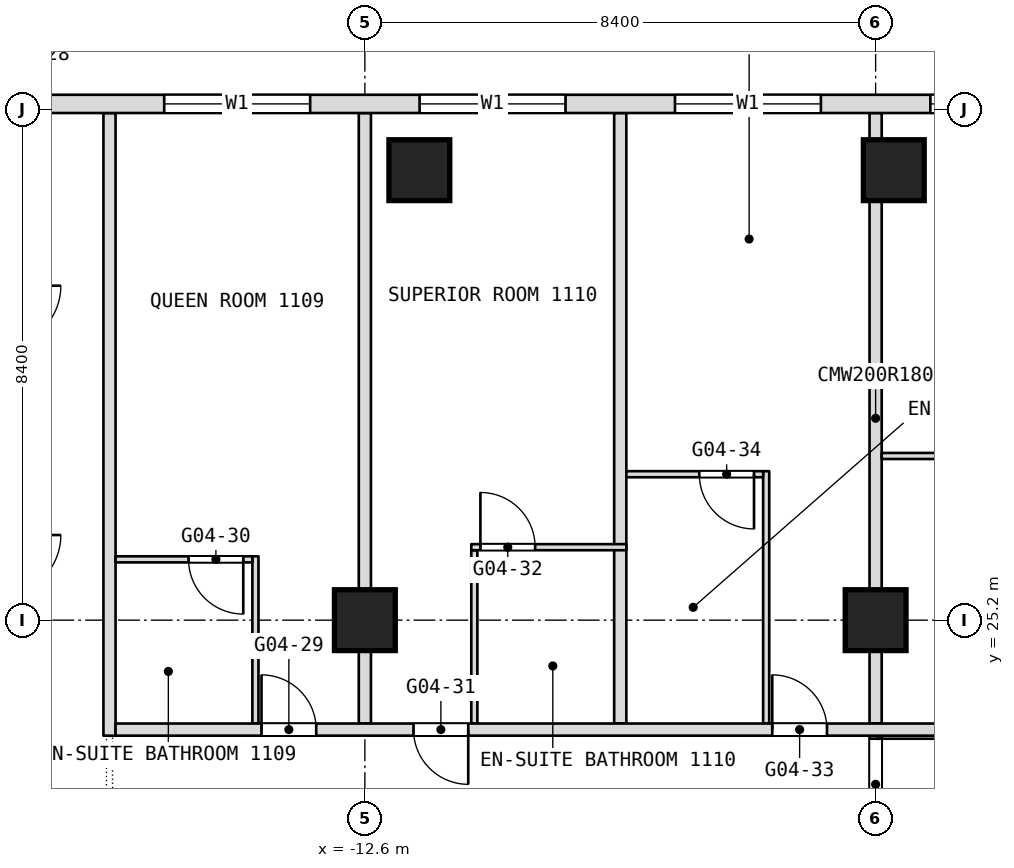
"""IFC4 building model, lengths in metres.
Left out: names, types, materials, properties, quantities, classifications, styles, units other than length and angle.
Written with IfcOpenShell. Run it as: python <this file> out.ifc"""

import sys

from ifc_helpers import new_model, si_unit, direction, frame, frame_2d, origin, origin_2d, place, context, subcontext, project, spatial, rectangle, extrude, element, fill, save


model = new_model("IFC4")
c1 = context("Model", 3, precision=1e-05, world=origin(), true_north=direction((0.0, 1.0)))
c2 = subcontext(c1, "Body", "Model", "MODEL_VIEW")
j1 = project(units=[si_unit("LENGTHUNIT", "METRE"), si_unit("PLANEANGLEUNIT", "RADIAN")], contexts=[c1])
p1 = place(None, origin())
s1 = spatial("IfcSite", under=j1, at=p1, CompositionType="ELEMENT")
p2 = place(p1, origin())
s2 = spatial("IfcBuilding", under=s1, at=p2, CompositionType="ELEMENT")
p3 = place(p2, frame((0.0, 0.0, 54.5)))
s3 = spatial("IfcBuildingStorey", under=s2, at=p3, CompositionType="ELEMENT", Elevation=54.5)
for number, where, z_axis, x_axis in (
    (1, (-12.6, 25.2, 0.0), (0.0, 0.0, 1.0), (1.0, 0.0, 0.0)),
    (2, (-4.2, 25.2, 0.0), (0.0, 0.0, 1.0), (1.0, 0.0, 0.0)),
    (3, (-11.704, 32.6, 0.0), (0.0, 0.0, 1.0), (1.0, 0.0, 0.0)),
    (4, (-3.901, 32.6, 0.0), (0.0, 0.0, 1.0), (1.0, 0.0, 0.0)),
):
    element("IfcColumn", number, at=place(p3, frame(where, z_axis=z_axis, x_axis=x_axis)), inside=s3, PredefinedType="COLUMN", context=c2, shape_type="SweptSolid", body=[
        extrude(rectangle(XDim=1.0, YDim=1.0, at=origin_2d()), origin(), (0.0, 0.0, 1.0), 3.6),
    ])
p4 = place(p3, frame((-4.2, 16.8, 0.0), z_axis=(0.0, 0.0, 1.0), x_axis=(0.0, 1.0, 0.0)))
e5 = element("IfcWall", 5, at=p4, inside=s3, PredefinedType="PARTITIONING", context=c2, shape_type="SweptSolid", body=[
    extrude(rectangle(XDim=6.7, YDim=0.2, at=frame_2d((3.35, 0.0))), origin(), (0.0, 0.0, 1.0), 3.34),
])
p5 = place(p4, frame((0.15, 0.0, 0.0)))
e6 = element("IfcOpeningElement", 6, at=p5, cuts=e5, PredefinedType="OPENING", context=c2, shape_type="SweptSolid", body=[
    extrude(rectangle(XDim=1.5, YDim=2.1, at=frame_2d((0.75, 1.05))), frame((0.0, 0.1, 0.0), z_axis=(0.0, -1.0, 0.0), x_axis=(1.0, 0.0, 0.0)), (0.0, 0.0, 1.0), 0.2),
])
p6 = place(p4, frame((4.95, 0.0, 0.0)))
e7 = element("IfcOpeningElement", 7, at=p6, cuts=e5, PredefinedType="OPENING", context=c2, shape_type="SweptSolid", body=[
    extrude(rectangle(XDim=1.5, YDim=2.1, at=frame_2d((0.75, 1.05))), frame((0.0, 0.1, 0.0), z_axis=(0.0, -1.0, 0.0), x_axis=(1.0, 0.0, 0.0)), (0.0, 0.0, 1.0), 0.2),
])
p7 = place(p3, frame((-4.2, 23.5, 0.0), z_axis=(0.0, 0.0, 1.0), x_axis=(0.0, 1.0, 0.0)))
e8 = element("IfcWall", 8, at=p7, inside=s3, PredefinedType="PARTITIONING", context=c2, shape_type="SweptSolid", body=[
    extrude(rectangle(XDim=10.04, YDim=0.2, at=frame_2d((5.02, 0.0))), origin(), (0.0, 0.0, 1.0), 3.34),
])
p8 = place(p3, frame((-6.0, 23.5, 0.0), z_axis=(0.0, 0.0, 1.0), x_axis=(0.0, 1.0, 0.0)))
e9 = element("IfcWall", 9, at=p8, inside=s3, PredefinedType="PARTITIONING", context=c2, shape_type="SweptSolid", body=[
    extrude(rectangle(XDim=4.15, YDim=0.1, at=frame_2d((2.075, 0.0))), origin(), (0.0, 0.0, 1.0), 3.34),
])
p9 = place(p3, frame((-8.4, 23.5, 0.0), z_axis=(0.0, 0.0, 1.0), x_axis=(0.0, 1.0, 0.0)))
e10 = element("IfcWall", 10, at=p9, inside=s3, PredefinedType="PARTITIONING", context=c2, shape_type="SweptSolid", body=[
    extrude(rectangle(XDim=10.04, YDim=0.2, at=frame_2d((5.02, 0.0))), origin(), (0.0, 0.0, 1.0), 3.34),
])
p10 = place(p3, frame((-10.8, 23.5, 0.0), z_axis=(0.0, 0.0, 1.0), x_axis=(0.0, 1.0, 0.0)))
e11 = element("IfcWall", 11, at=p10, inside=s3, PredefinedType="PARTITIONING", context=c2, shape_type="SweptSolid", body=[
    extrude(rectangle(XDim=2.85, YDim=0.1, at=frame_2d((1.425, 0.0))), origin(), (0.0, 0.0, 1.0), 3.34),
])
p11 = place(p3, frame((-12.6, 23.5, 0.0), z_axis=(0.0, 0.0, 1.0), x_axis=(0.0, 1.0, 0.0)))
e12 = element("IfcWall", 12, at=p11, inside=s3, PredefinedType="PARTITIONING", context=c2, shape_type="SweptSolid", body=[
    extrude(rectangle(XDim=10.04, YDim=0.2, at=frame_2d((5.02, 0.0))), origin(), (0.0, 0.0, 1.0), 3.34),
])
p12 = place(p3, frame((-14.4, 23.5, 0.0), z_axis=(0.0, 0.0, 1.0), x_axis=(0.0, 1.0, 0.0)))
e13 = element("IfcWall", 13, at=p12, inside=s3, PredefinedType="PARTITIONING", context=c2, shape_type="SweptSolid", body=[
    extrude(rectangle(XDim=2.75, YDim=0.1, at=frame_2d((1.375, 0.0))), origin(), (0.0, 0.0, 1.0), 3.34),
])
p13 = place(p3, frame((-16.8, 23.3, 0.0), z_axis=(0.0, 0.0, 1.0), x_axis=(0.0, 1.0, 0.0)))
e14 = element("IfcWall", 14, at=p13, inside=s3, PredefinedType="PARTITIONING", context=c2, shape_type="SweptSolid", body=[
    extrude(rectangle(XDim=10.24, YDim=0.2, at=frame_2d((5.12, 0.0))), origin(), (0.0, 0.0, 1.0), 3.34),
])
p14 = place(p3, frame((-16.7, 23.4, 0.0), z_axis=(0.0, 0.0, 1.0), x_axis=(1.0, 0.0, 0.0)))
e15 = element("IfcWall", 15, at=p14, inside=s3, PredefinedType="PARTITIONING", context=c2, shape_type="SweptSolid", body=[
    extrude(rectangle(XDim=23.4, YDim=0.2, at=frame_2d((11.7, 0.0))), origin(), (0.0, 0.0, 1.0), 3.34),
])
p15 = place(p14, frame((2.4, 0.0, 0.0)))
e16 = element("IfcOpeningElement", 16, at=p15, cuts=e15, PredefinedType="OPENING", context=c2, shape_type="SweptSolid", body=[
    extrude(rectangle(XDim=0.9, YDim=2.1, at=frame_2d((0.45, 1.05))), frame((0.0, 0.1, 0.0), z_axis=(0.0, -1.0, 0.0), x_axis=(1.0, 0.0, 0.0)), (0.0, 0.0, 1.0), 0.2),
])
p16 = place(p14, frame((4.9, 0.0, 0.0)))
e17 = element("IfcOpeningElement", 17, at=p16, cuts=e15, PredefinedType="OPENING", context=c2, shape_type="SweptSolid", body=[
    extrude(rectangle(XDim=0.9, YDim=2.1, at=frame_2d((0.45, 1.05))), frame((0.0, 0.1, 0.0), z_axis=(0.0, -1.0, 0.0), x_axis=(1.0, 0.0, 0.0)), (0.0, 0.0, 1.0), 0.2),
])
p17 = place(p14, frame((10.8, 0.0, 0.0)))
e18 = element("IfcOpeningElement", 18, at=p17, cuts=e15, PredefinedType="OPENING", context=c2, shape_type="SweptSolid", body=[
    extrude(rectangle(XDim=0.9, YDim=2.1, at=frame_2d((0.45, 1.05))), frame((0.0, 0.1, 0.0), z_axis=(0.0, -1.0, 0.0), x_axis=(1.0, 0.0, 0.0)), (0.0, 0.0, 1.0), 0.2),
])
p18 = place(p14, frame((16.2, 0.0, 0.0)))
e19 = element("IfcOpeningElement", 19, at=p18, cuts=e15, PredefinedType="OPENING", context=c2, shape_type="SweptSolid", body=[
    extrude(rectangle(XDim=1.1, YDim=2.1, at=frame_2d((0.55, 1.05))), frame((0.0, 0.1, 0.0), z_axis=(0.0, -1.0, 0.0), x_axis=(1.0, 0.0, 0.0)), (0.0, 0.0, 1.0), 0.2),
])
p19 = place(p14, frame((21.7, 0.0, 0.0)))
e20 = element("IfcOpeningElement", 20, at=p19, cuts=e15, PredefinedType="OPENING", context=c2, shape_type="SweptSolid", body=[
    extrude(rectangle(XDim=0.9, YDim=2.1, at=frame_2d((0.45, 1.05))), frame((0.0, 0.1, 0.0), z_axis=(0.0, -1.0, 0.0), x_axis=(1.0, 0.0, 0.0)), (0.0, 0.0, 1.0), 0.2),
])
p20 = place(p3, frame((-16.7, 26.2, 0.0), z_axis=(0.0, 0.0, 1.0), x_axis=(1.0, 0.0, 0.0)))
e21 = element("IfcWall", 21, at=p20, inside=s3, PredefinedType="PARTITIONING", context=c2, shape_type="SweptSolid", body=[
    extrude(rectangle(XDim=2.25, YDim=0.1, at=frame_2d((1.125, 0.0))), origin(), (0.0, 0.0, 1.0), 3.34),
])
p21 = place(p20, frame((1.2, 0.0, 0.0)))
e22 = element("IfcOpeningElement", 22, at=p21, cuts=e21, PredefinedType="OPENING", context=c2, shape_type="SweptSolid", body=[
    extrude(rectangle(XDim=0.9, YDim=2.1, at=frame_2d((0.45, 1.05))), frame((0.0, 0.05, 0.0), z_axis=(0.0, -1.0, 0.0), x_axis=(1.0, 0.0, 0.0)), (0.0, 0.0, 1.0), 0.1),
])
p22 = place(p3, frame((-10.85, 26.4, 0.0), z_axis=(0.0, 0.0, 1.0), x_axis=(1.0, 0.0, 0.0)))
e23 = element("IfcWall", 23, at=p22, inside=s3, PredefinedType="PARTITIONING", context=c2, shape_type="SweptSolid", body=[
    extrude(rectangle(XDim=2.55, YDim=0.1, at=frame_2d((1.275, 0.0))), origin(), (0.0, 0.0, 1.0), 3.34),
])
p23 = place(p22, frame((0.15, 0.0, 0.0)))
e24 = element("IfcOpeningElement", 24, at=p23, cuts=e23, PredefinedType="OPENING", context=c2, shape_type="SweptSolid", body=[
    extrude(rectangle(XDim=0.9, YDim=2.1, at=frame_2d((0.45, 1.05))), frame((0.0, 0.05, 0.0), z_axis=(0.0, -1.0, 0.0), x_axis=(1.0, 0.0, 0.0)), (0.0, 0.0, 1.0), 0.1),
])
p24 = place(p3, frame((-8.3, 27.6, 0.0), z_axis=(0.0, 0.0, 1.0), x_axis=(1.0, 0.0, 0.0)))
e25 = element("IfcWall", 25, at=p24, inside=s3, PredefinedType="PARTITIONING", context=c2, shape_type="SweptSolid", body=[
    extrude(rectangle(XDim=2.25, YDim=0.1, at=frame_2d((1.125, 0.0))), origin(), (0.0, 0.0, 1.0), 3.34),
])
p25 = place(p24, frame((1.2, 0.0, 0.0)))
e26 = element("IfcOpeningElement", 26, at=p25, cuts=e25, PredefinedType="OPENING", context=c2, shape_type="SweptSolid", body=[
    extrude(rectangle(XDim=0.9, YDim=2.1, at=frame_2d((0.45, 1.05))), frame((0.0, 0.05, 0.0), z_axis=(0.0, -1.0, 0.0), x_axis=(1.0, 0.0, 0.0)), (0.0, 0.0, 1.0), 0.1),
])
p26 = place(p3, frame((-4.1, 27.9, 0.0), z_axis=(0.0, 0.0, 1.0), x_axis=(1.0, 0.0, 0.0)))
e27 = element("IfcWall", 27, at=p26, inside=s3, PredefinedType="PARTITIONING", context=c2, shape_type="SweptSolid", body=[
    extrude(rectangle(XDim=3.45, YDim=0.1, at=frame_2d((1.725, 0.0))), origin(), (0.0, 0.0, 1.0), 3.34),
])
p27 = place(p26, frame((2.4, 0.0, 0.0)))
e28 = element("IfcOpeningElement", 28, at=p27, cuts=e27, PredefinedType="OPENING", context=c2, shape_type="SweptSolid", body=[
    extrude(rectangle(XDim=0.9, YDim=2.1, at=frame_2d((0.45, 1.05))), frame((0.0, 0.05, 0.0), z_axis=(0.0, -1.0, 0.0), x_axis=(1.0, 0.0, 0.0)), (0.0, 0.0, 1.0), 0.1),
])
p28 = place(p3, frame((23.406, 33.69, 0.0), z_axis=(0.0, 0.0, 1.0), x_axis=(-1.0, 0.0, 0.0)))
e29 = element("IfcWall", 29, at=p28, inside=s3, PredefinedType="NOTDEFINED", context=c2, shape_type="SweptSolid", body=[
    extrude(rectangle(XDim=46.812, YDim=0.3, at=frame_2d((23.406, 0.0))), origin(), (0.0, 0.0, 1.0), 3.6),
])
p29 = place(p28, frame((2.186, 0.0, 0.9)))
e30 = element("IfcOpeningElement", 30, at=p29, cuts=e29, PredefinedType="OPENING", context=c2, shape_type="SweptSolid", body=[
    extrude(rectangle(XDim=2.4, YDim=2.1, at=frame_2d((1.2, 1.05))), frame((0.0, 0.15, 0.0), z_axis=(0.0, -1.0, 0.0), x_axis=(1.0, 0.0, 0.0)), (0.0, 0.0, 1.0), 0.3),
])
p30 = place(p28, frame((7.506, 0.0, 0.9)))
e31 = element("IfcOpeningElement", 31, at=p30, cuts=e29, PredefinedType="OPENING", context=c2, shape_type="SweptSolid", body=[
    extrude(rectangle(XDim=2.4, YDim=2.1, at=frame_2d((1.2, 1.05))), frame((0.0, 0.15, 0.0), z_axis=(0.0, -1.0, 0.0), x_axis=(1.0, 0.0, 0.0)), (0.0, 0.0, 1.0), 0.3),
])
p31 = place(p28, frame((11.706, 0.0, 0.9)))
e32 = element("IfcOpeningElement", 32, at=p31, cuts=e29, PredefinedType="OPENING", context=c2, shape_type="SweptSolid", body=[
    extrude(rectangle(XDim=2.4, YDim=2.1, at=frame_2d((1.2, 1.05))), frame((0.0, 0.15, 0.0), z_axis=(0.0, -1.0, 0.0), x_axis=(1.0, 0.0, 0.0)), (0.0, 0.0, 1.0), 0.3),
])
p32 = place(p28, frame((15.906, 0.0, 0.9)))
e33 = element("IfcOpeningElement", 33, at=p32, cuts=e29, PredefinedType="OPENING", context=c2, shape_type="SweptSolid", body=[
    extrude(rectangle(XDim=2.4, YDim=2.1, at=frame_2d((1.2, 1.05))), frame((0.0, 0.15, 0.0), z_axis=(0.0, -1.0, 0.0), x_axis=(1.0, 0.0, 0.0)), (0.0, 0.0, 1.0), 0.3),
])
p33 = place(p28, frame((20.106, 0.0, 0.9)))
e34 = element("IfcOpeningElement", 34, at=p33, cuts=e29, PredefinedType="OPENING", context=c2, shape_type="SweptSolid", body=[
    extrude(rectangle(XDim=2.4, YDim=2.1, at=frame_2d((1.2, 1.05))), frame((0.0, 0.15, 0.0), z_axis=(0.0, -1.0, 0.0), x_axis=(1.0, 0.0, 0.0)), (0.0, 0.0, 1.0), 0.3),
])
p34 = place(p28, frame((24.306, 0.0, 0.9)))
e35 = element("IfcOpeningElement", 35, at=p34, cuts=e29, PredefinedType="OPENING", context=c2, shape_type="SweptSolid", body=[
    extrude(rectangle(XDim=2.4, YDim=2.1, at=frame_2d((1.2, 1.05))), frame((0.0, 0.15, 0.0), z_axis=(0.0, -1.0, 0.0), x_axis=(1.0, 0.0, 0.0)), (0.0, 0.0, 1.0), 0.3),
])
p35 = place(p28, frame((28.506, 0.0, 0.9)))
e36 = element("IfcOpeningElement", 36, at=p35, cuts=e29, PredefinedType="OPENING", context=c2, shape_type="SweptSolid", body=[
    extrude(rectangle(XDim=2.4, YDim=2.1, at=frame_2d((1.2, 1.05))), frame((0.0, 0.15, 0.0), z_axis=(0.0, -1.0, 0.0), x_axis=(1.0, 0.0, 0.0)), (0.0, 0.0, 1.0), 0.3),
])
p36 = place(p28, frame((32.706, 0.0, 0.9)))
e37 = element("IfcOpeningElement", 37, at=p36, cuts=e29, PredefinedType="OPENING", context=c2, shape_type="SweptSolid", body=[
    extrude(rectangle(XDim=2.4, YDim=2.1, at=frame_2d((1.2, 1.05))), frame((0.0, 0.15, 0.0), z_axis=(0.0, -1.0, 0.0), x_axis=(1.0, 0.0, 0.0)), (0.0, 0.0, 1.0), 0.3),
])
p37 = place(p28, frame((36.906, 0.0, 0.9)))
e38 = element("IfcOpeningElement", 38, at=p37, cuts=e29, PredefinedType="OPENING", context=c2, shape_type="SweptSolid", body=[
    extrude(rectangle(XDim=2.4, YDim=2.1, at=frame_2d((1.2, 1.05))), frame((0.0, 0.15, 0.0), z_axis=(0.0, -1.0, 0.0), x_axis=(1.0, 0.0, 0.0)), (0.0, 0.0, 1.0), 0.3),
])
p38 = place(p28, frame((42.226, 0.0, 0.9)))
e39 = element("IfcOpeningElement", 39, at=p38, cuts=e29, PredefinedType="OPENING", context=c2, shape_type="SweptSolid", body=[
    extrude(rectangle(XDim=2.4, YDim=2.1, at=frame_2d((1.2, 1.05))), frame((0.0, 0.15, 0.0), z_axis=(0.0, -1.0, 0.0), x_axis=(1.0, 0.0, 0.0)), (0.0, 0.0, 1.0), 0.3),
])
p39 = place(p15, origin())
e40 = element("IfcDoor", 40, at=p39, inside=s3, OperationType="SINGLE_SWING_LEFT", PredefinedType="DOOR", context=c2, shape_type="SweptSolid", body=[
    extrude(rectangle(XDim=0.9, YDim=2.1, at=frame_2d((0.45, 1.05))), frame((0.0, 0.025, 0.0), z_axis=(0.0, -1.0, 0.0), x_axis=(1.0, 0.0, 0.0)), (0.0, 0.0, 1.0), 0.05),
])
fill(e16, e40)
p40 = place(p16, origin())
e41 = element("IfcDoor", 41, at=p40, inside=s3, OperationType="SINGLE_SWING_RIGHT", PredefinedType="DOOR", context=c2, shape_type="SweptSolid", body=[
    extrude(rectangle(XDim=0.9, YDim=2.1, at=frame_2d((0.45, 1.05))), frame((0.0, 0.025, 0.0), z_axis=(0.0, -1.0, 0.0), x_axis=(1.0, 0.0, 0.0)), (0.0, 0.0, 1.0), 0.05),
])
fill(e17, e41)
p41 = place(p17, origin())
e42 = element("IfcDoor", 42, at=p41, inside=s3, OperationType="SINGLE_SWING_LEFT", PredefinedType="DOOR", context=c2, shape_type="SweptSolid", body=[
    extrude(rectangle(XDim=0.9, YDim=2.1, at=frame_2d((0.45, 1.05))), frame((0.0, 0.025, 0.0), z_axis=(0.0, -1.0, 0.0), x_axis=(1.0, 0.0, 0.0)), (0.0, 0.0, 1.0), 0.05),
])
fill(e18, e42)
p42 = place(p21, origin())
e43 = element("IfcDoor", 43, at=p42, inside=s3, OperationType="SINGLE_SWING_LEFT", PredefinedType="DOOR", context=c2, shape_type="SweptSolid", body=[
    extrude(rectangle(XDim=0.9, YDim=2.1, at=frame_2d((0.45, 1.05))), frame((0.0, 0.025, 0.0), z_axis=(0.0, -1.0, 0.0), x_axis=(1.0, 0.0, 0.0)), (0.0, 0.0, 1.0), 0.05),
])
fill(e22, e43)
p43 = place(p23, origin())
e44 = element("IfcDoor", 44, at=p43, inside=s3, OperationType="SINGLE_SWING_RIGHT", PredefinedType="DOOR", context=c2, shape_type="SweptSolid", body=[
    extrude(rectangle(XDim=0.9, YDim=2.1, at=frame_2d((0.45, 1.05))), frame((0.0, 0.025, 0.0), z_axis=(0.0, -1.0, 0.0), x_axis=(1.0, 0.0, 0.0)), (0.0, 0.0, 1.0), 0.05),
])
fill(e24, e44)
p44 = place(p25, origin())
e45 = element("IfcDoor", 45, at=p44, inside=s3, OperationType="SINGLE_SWING_LEFT", PredefinedType="DOOR", context=c2, shape_type="SweptSolid", body=[
    extrude(rectangle(XDim=0.9, YDim=2.1, at=frame_2d((0.45, 1.05))), frame((0.0, 0.025, 0.0), z_axis=(0.0, -1.0, 0.0), x_axis=(1.0, 0.0, 0.0)), (0.0, 0.0, 1.0), 0.05),
])
fill(e26, e45)
p45 = place(p34, origin())
e46 = element("IfcWindow", 46, at=p45, inside=s3, PartitioningType="SINGLE_PANEL", PredefinedType="WINDOW", context=c2, shape_type="SweptSolid", body=[
    extrude(rectangle(XDim=2.4, YDim=2.1, at=frame_2d((1.2, 1.05))), frame((0.0, 0.03, 0.0), z_axis=(0.0, -1.0, 0.0), x_axis=(1.0, 0.0, 0.0)), (0.0, 0.0, 1.0), 0.06),
])
fill(e35, e46)
p46 = place(p35, origin())
e47 = element("IfcWindow", 47, at=p46, inside=s3, PartitioningType="SINGLE_PANEL", PredefinedType="WINDOW", context=c2, shape_type="SweptSolid", body=[
    extrude(rectangle(XDim=2.4, YDim=2.1, at=frame_2d((1.2, 1.05))), frame((0.0, 0.03, 0.0), z_axis=(0.0, -1.0, 0.0), x_axis=(1.0, 0.0, 0.0)), (0.0, 0.0, 1.0), 0.06),
])
fill(e36, e47)
p47 = place(p36, origin())
e48 = element("IfcWindow", 48, at=p47, inside=s3, PartitioningType="SINGLE_PANEL", PredefinedType="WINDOW", context=c2, shape_type="SweptSolid", body=[
    extrude(rectangle(XDim=2.4, YDim=2.1, at=frame_2d((1.2, 1.05))), frame((0.0, 0.03, 0.0), z_axis=(0.0, -1.0, 0.0), x_axis=(1.0, 0.0, 0.0)), (0.0, 0.0, 1.0), 0.06),
])
fill(e37, e48)
p48 = place(p37, origin())
e49 = element("IfcWindow", 49, at=p48, inside=s3, PartitioningType="SINGLE_PANEL", PredefinedType="WINDOW", context=c2, shape_type="SweptSolid", body=[
    extrude(rectangle(XDim=2.4, YDim=2.1, at=frame_2d((1.2, 1.05))), frame((0.0, 0.03, 0.0), z_axis=(0.0, -1.0, 0.0), x_axis=(1.0, 0.0, 0.0)), (0.0, 0.0, 1.0), 0.06),
])
fill(e38, e49)
p49 = place(p6, origin())
e50 = element("IfcDoor", 50, at=p49, inside=s3, OperationType="DOUBLE_DOOR_DOUBLE_SWING", PredefinedType="DOOR", context=c2, shape_type="SweptSolid", body=[
    extrude(rectangle(XDim=1.5, YDim=2.1, at=frame_2d((0.75, 1.05))), frame((0.0, 0.025, 0.0), z_axis=(0.0, -1.0, 0.0), x_axis=(1.0, 0.0, 0.0)), (0.0, 0.0, 1.0), 0.05),
])
fill(e7, e50)
save(model, sys.argv[1])
